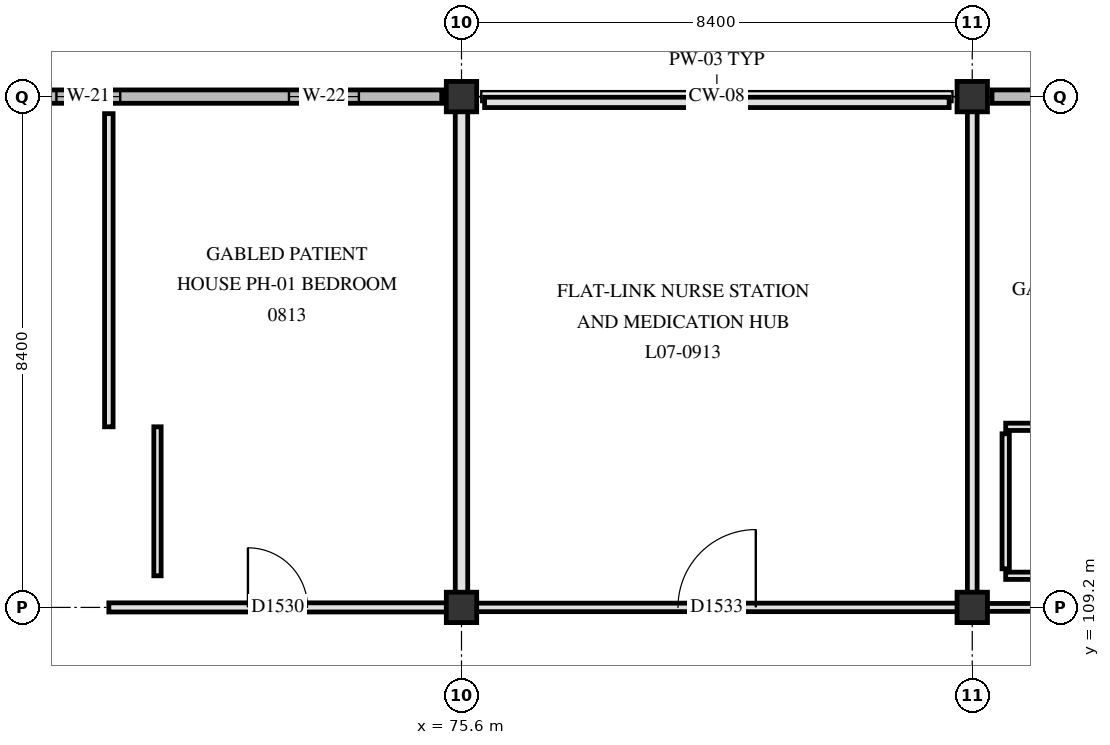
"""IFC4 building model, lengths in metres.
Left out: names, types, materials, properties, quantities, classifications, styles, units other than length and angle.
Written with IfcOpenShell. Run it as: python <this file> out.ifc"""

import sys

from ifc_helpers import new_model, si_unit, direction, frame, frame_2d, origin, origin_2d, place, context, subcontext, project, spatial, polyline, rectangle, outline, extrude, element, fill, save


model = new_model("IFC4")
c1 = context("Model", 3, precision=1e-05, world=origin(), true_north=direction((0.0, 1.0)))
c2 = subcontext(c1, "Body", "Model", "MODEL_VIEW")
j1 = project(units=[si_unit("LENGTHUNIT", "METRE"), si_unit("PLANEANGLEUNIT", "RADIAN")], contexts=[c1])
p1 = place(None, origin())
s1 = spatial("IfcSite", under=j1, at=p1, CompositionType="ELEMENT")
p2 = place(p1, origin())
s2 = spatial("IfcBuilding", under=s1, at=p2, CompositionType="ELEMENT")
p3 = place(p2, frame((0.0, 0.0, 30.3)))
s3 = spatial("IfcBuildingStorey", under=s2, at=p3, CompositionType="ELEMENT", Elevation=30.3)
for number, where, z_axis, x_axis in (
    (1, (75.6, 109.2, 0.0), (0.0, 0.0, 1.0), (1.0, 0.0, 0.0)),
    (2, (75.6, 117.6, 0.0), (0.0, 0.0, 1.0), (1.0, 0.0, 0.0)),
    (3, (84.0, 109.2, 0.0), (0.0, 0.0, 1.0), (1.0, 0.0, 0.0)),
    (4, (84.0, 117.6, 0.0), (0.0, 0.0, 1.0), (1.0, 0.0, 0.0)),
):
    element("IfcColumn", number, at=place(p3, frame(where, z_axis=z_axis, x_axis=x_axis)), inside=s3, PredefinedType="COLUMN", context=c2, shape_type="SweptSolid", body=[
        extrude(rectangle(XDim=0.5, YDim=0.5, at=origin_2d()), origin(), (0.0, 0.0, 1.0), 3.9),
    ])
p4 = place(p3, frame((67.525, 117.6, 0.0), z_axis=(0.0, 0.0, 1.0), x_axis=(1.0, 0.0, 0.0)))
e5 = element("IfcWall", 5, at=p4, inside=s3, PredefinedType="SOLIDWALL", context=c2, shape_type="SweptSolid", body=[
    extrude(outline(polyline([(0.0, 0.0), (7.75, 0.0), (7.75, 3.4), (3.875, 5.76), (0.0, 3.4), (0.0, 0.0)])), frame((0.0, 0.11, 0.0), z_axis=(0.0, -1.0, 0.0), x_axis=(1.0, 0.0, 0.0)), (0.0, 0.0, 1.0), 0.22),
])
p5 = place(p4, frame((1.413, 0.0, 0.85)))
e6 = element("IfcOpeningElement", 6, at=p5, cuts=e5, PredefinedType="OPENING", context=c2, shape_type="SweptSolid", body=[
    extrude(rectangle(XDim=1.05, YDim=1.54, at=frame_2d((0.525, 0.77))), frame((0.0, 0.12, 0.0), z_axis=(0.0, -1.0, 0.0), x_axis=(1.0, 0.0, 0.0)), (0.0, 0.0, 1.0), 0.24),
])
p6 = place(p4, frame((5.238, 0.0, 0.85)))
e7 = element("IfcOpeningElement", 7, at=p6, cuts=e5, PredefinedType="OPENING", context=c2, shape_type="SweptSolid", body=[
    extrude(rectangle(XDim=1.15, YDim=1.54, at=frame_2d((0.575, 0.77))), frame((0.0, 0.12, 0.0), z_axis=(0.0, -1.0, 0.0), x_axis=(1.0, 0.0, 0.0)), (0.0, 0.0, 1.0), 0.24),
])
p7 = place(p3, frame((84.325, 117.6, 0.0), z_axis=(0.0, 0.0, 1.0), x_axis=(1.0, 0.0, 0.0)))
e8 = element("IfcWall", 8, at=p7, inside=s3, PredefinedType="SOLIDWALL", context=c2, shape_type="SweptSolid", body=[
    extrude(outline(polyline([(0.0, 0.0), (7.75, 0.0), (7.75, 3.4), (3.875, 5.76), (0.0, 3.4), (0.0, 0.0)])), frame((0.0, 0.11, 0.0), z_axis=(0.0, -1.0, 0.0), x_axis=(1.0, 0.0, 0.0)), (0.0, 0.0, 1.0), 0.22),
])
p8 = place(p7, frame((1.312, 0.0, 0.85)))
e9 = element("IfcOpeningElement", 9, at=p8, cuts=e8, PredefinedType="OPENING", context=c2, shape_type="SweptSolid", body=[
    extrude(rectangle(XDim=1.25, YDim=1.54, at=frame_2d((0.625, 0.77))), frame((0.0, 0.12, 0.0), z_axis=(0.0, -1.0, 0.0), x_axis=(1.0, 0.0, 0.0)), (0.0, 0.0, 1.0), 0.24),
])
p9 = place(p7, frame((5.137, 0.0, 0.85)))
e10 = element("IfcOpeningElement", 10, at=p9, cuts=e8, PredefinedType="OPENING", context=c2, shape_type="SweptSolid", body=[
    extrude(rectangle(XDim=1.35, YDim=1.54, at=frame_2d((0.675, 0.77))), frame((0.0, 0.12, 0.0), z_axis=(0.0, -1.0, 0.0), x_axis=(1.0, 0.0, 0.0)), (0.0, 0.0, 1.0), 0.24),
])
p10 = place(p3, frame((75.98, 117.505, 3.88), z_axis=(0.0, 0.0, 1.0), x_axis=(1.0, 0.0, 0.0)))
e11 = element("IfcWall", 11, at=p10, inside=s3, PredefinedType="PARAPET", context=c2, shape_type="SweptSolid", body=[
    extrude(rectangle(XDim=7.64, YDim=0.17, at=frame_2d((3.82, 0.0))), origin(), (0.0, 0.0, 1.0), 0.47),
])
p11 = place(p3, frame((69.8, 109.2, 0.0), z_axis=(0.0, 0.0, 1.0), x_axis=(1.0, 0.0, 0.0)))
e12 = element("IfcWall", 12, at=p11, inside=s3, PredefinedType="PARTITIONING", context=c2, shape_type="SweptSolid", body=[
    extrude(rectangle(XDim=5.555, YDim=0.15, at=frame_2d((2.777, 0.0))), origin(), (0.0, 0.0, 1.0), 3.25),
])
p12 = place(p11, frame((2.288, 0.0, 0.0)))
e13 = element("IfcOpeningElement", 13, at=p12, cuts=e12, PredefinedType="OPENING", context=c2, shape_type="SweptSolid", body=[
    extrude(rectangle(XDim=0.98, YDim=2.12, at=frame_2d((0.49, 1.06))), frame((0.0, 0.085, 0.0), z_axis=(0.0, -1.0, 0.0), x_axis=(1.0, 0.0, 0.0)), (0.0, 0.0, 1.0), 0.17),
])
p13 = place(p3, frame((75.845, 109.2, 0.0), z_axis=(0.0, 0.0, 1.0), x_axis=(1.0, 0.0, 0.0)))
e14 = element("IfcWall", 14, at=p13, inside=s3, PredefinedType="PARTITIONING", context=c2, shape_type="SweptSolid", body=[
    extrude(rectangle(XDim=7.91, YDim=0.14, at=frame_2d((3.955, 0.0))), origin(), (0.0, 0.0, 1.0), 3.25),
])
p14 = place(p13, frame((3.315, 0.0, 0.0)))
e15 = element("IfcOpeningElement", 15, at=p14, cuts=e14, PredefinedType="OPENING", context=c2, shape_type="SweptSolid", body=[
    extrude(rectangle(XDim=1.28, YDim=2.18, at=frame_2d((0.64, 1.09))), frame((0.0, 0.08, 0.0), z_axis=(0.0, -1.0, 0.0), x_axis=(1.0, 0.0, 0.0)), (0.0, 0.0, 1.0), 0.16),
])
p15 = place(p3, frame((84.245, 109.2, 0.0), z_axis=(0.0, 0.0, 1.0), x_axis=(1.0, 0.0, 0.0)))
e16 = element("IfcWall", 16, at=p15, inside=s3, PredefinedType="PARTITIONING", context=c2, shape_type="SweptSolid", body=[
    extrude(rectangle(XDim=7.91, YDim=0.13, at=frame_2d((3.955, 0.0))), origin(), (0.0, 0.0, 1.0), 3.25),
])
p16 = place(p15, frame((3.28, 0.0, 0.0)))
e17 = element("IfcOpeningElement", 17, at=p16, cuts=e16, PredefinedType="OPENING", context=c2, shape_type="SweptSolid", body=[
    extrude(rectangle(XDim=1.35, YDim=2.2, at=frame_2d((0.675, 1.1))), frame((0.0, 0.075, 0.0), z_axis=(0.0, -1.0, 0.0), x_axis=(1.0, 0.0, 0.0)), (0.0, 0.0, 1.0), 0.15),
])
p17 = place(p3, frame((84.55, 109.72, 0.0), z_axis=(0.0, 0.0, 1.0), x_axis=(1.0, 0.0, 0.0)))
e18 = element("IfcWall", 18, at=p17, inside=s3, PredefinedType="PARTITIONING", context=c2, shape_type="SweptSolid", body=[
    extrude(rectangle(XDim=2.85, YDim=0.12, at=frame_2d((1.425, 0.0))), origin(), (0.0, 0.0, 1.0), 3.65),
])
p18 = place(p3, frame((84.55, 112.17, 0.0), z_axis=(0.0, 0.0, 1.0), x_axis=(1.0, 0.0, 0.0)))
e19 = element("IfcWall", 19, at=p18, inside=s3, PredefinedType="PARTITIONING", context=c2, shape_type="SweptSolid", body=[
    extrude(rectangle(XDim=2.85, YDim=0.12, at=frame_2d((1.425, 0.0))), origin(), (0.0, 0.0, 1.0), 3.65),
])
p19 = place(p18, frame((0.95, 0.0, 0.0)))
e20 = element("IfcOpeningElement", 20, at=p19, cuts=e19, PredefinedType="OPENING", context=c2, shape_type="SweptSolid", body=[
    extrude(rectangle(XDim=0.95, YDim=2.1, at=frame_2d((0.475, 1.05))), frame((0.0, 0.07, 0.0), z_axis=(0.0, -1.0, 0.0), x_axis=(1.0, 0.0, 0.0)), (0.0, 0.0, 1.0), 0.14),
])
p20 = place(p3, frame((69.8, 112.17, 0.0), z_axis=(0.0, 0.0, 1.0), x_axis=(0.0, 1.0, 0.0)))
e21 = element("IfcWall", 21, at=p20, inside=s3, PredefinedType="PARTITIONING", context=c2, shape_type="SweptSolid", body=[
    extrude(rectangle(XDim=5.15, YDim=0.14, at=frame_2d((2.575, 0.0))), origin(), (0.0, 0.0, 1.0), 3.41),
])
p21 = place(p3, frame((70.6, 109.72, 0.0), z_axis=(0.0, 0.0, 1.0), x_axis=(0.0, 1.0, 0.0)))
e22 = element("IfcWall", 22, at=p21, inside=s3, PredefinedType="PARTITIONING", context=c2, shape_type="SweptSolid", body=[
    extrude(rectangle(XDim=2.45, YDim=0.12, at=frame_2d((1.225, 0.0))), origin(), (0.0, 0.0, 1.0), 3.41),
])
p22 = place(p3, frame((75.6, 109.445, 0.0), z_axis=(0.0, 0.0, 1.0), x_axis=(0.0, 1.0, 0.0)))
e23 = element("IfcWall", 23, at=p22, inside=s3, PredefinedType="PARTITIONING", context=c2, shape_type="SweptSolid", body=[
    extrude(rectangle(XDim=7.91, YDim=0.205, at=frame_2d((3.955, 0.0))), origin(), (0.0, 0.0, 1.0), 3.25),
])
p23 = place(p3, frame((84.0, 109.445, 0.0), z_axis=(0.0, 0.0, 1.0), x_axis=(0.0, 1.0, 0.0)))
e24 = element("IfcWall", 24, at=p23, inside=s3, PredefinedType="PARTITIONING", context=c2, shape_type="SweptSolid", body=[
    extrude(rectangle(XDim=7.91, YDim=0.16, at=frame_2d((3.955, 0.0))), origin(), (0.0, 0.0, 1.0), 3.25),
])
p24 = place(p3, frame((84.55, 109.835, 0.0), z_axis=(0.0, 0.0, 1.0), x_axis=(0.0, 1.0, 0.0)))
e25 = element("IfcWall", 25, at=p24, inside=s3, PredefinedType="PARTITIONING", context=c2, shape_type="SweptSolid", body=[
    extrude(rectangle(XDim=2.22, YDim=0.12, at=frame_2d((1.11, 0.0))), origin(), (0.0, 0.0, 1.0), 3.41),
])
p25 = place(p5, origin())
e26 = element("IfcWindow", 26, at=p25, inside=s3, PartitioningType="SINGLE_PANEL", PredefinedType="WINDOW", context=c2, shape_type="SweptSolid", body=[
    extrude(rectangle(XDim=1.05, YDim=1.54, at=frame_2d((0.525, 0.77))), frame((0.0, 0.03, 0.0), z_axis=(0.0, -1.0, 0.0), x_axis=(1.0, 0.0, 0.0)), (0.0, 0.0, 1.0), 0.06),
])
fill(e6, e26)
p26 = place(p6, origin())
e27 = element("IfcWindow", 27, at=p26, inside=s3, PartitioningType="SINGLE_PANEL", PredefinedType="WINDOW", context=c2, shape_type="SweptSolid", body=[
    extrude(rectangle(XDim=1.15, YDim=1.54, at=frame_2d((0.575, 0.77))), frame((0.0, 0.03, 0.0), z_axis=(0.0, -1.0, 0.0), x_axis=(1.0, 0.0, 0.0)), (0.0, 0.0, 1.0), 0.06),
])
fill(e7, e27)
p27 = place(p12, origin())
e28 = element("IfcDoor", 28, at=p27, inside=s3, OperationType="SINGLE_SWING_LEFT", PredefinedType="DOOR", context=c2, shape_type="SweptSolid", body=[
    extrude(rectangle(XDim=0.98, YDim=2.12, at=frame_2d((0.49, 1.06))), frame((0.0, 0.025, 0.0), z_axis=(0.0, -1.0, 0.0), x_axis=(1.0, 0.0, 0.0)), (0.0, 0.0, 1.0), 0.05),
])
fill(e13, e28)
p28 = place(p14, origin())
e29 = element("IfcDoor", 29, at=p28, inside=s3, OperationType="SINGLE_SWING_RIGHT", PredefinedType="DOOR", context=c2, shape_type="SweptSolid", body=[
    extrude(rectangle(XDim=1.28, YDim=2.18, at=frame_2d((0.64, 1.09))), frame((0.0, 0.025, 0.0), z_axis=(0.0, -1.0, 0.0), x_axis=(1.0, 0.0, 0.0)), (0.0, 0.0, 1.0), 0.05),
])
fill(e15, e29)
save(model, sys.argv[1])
